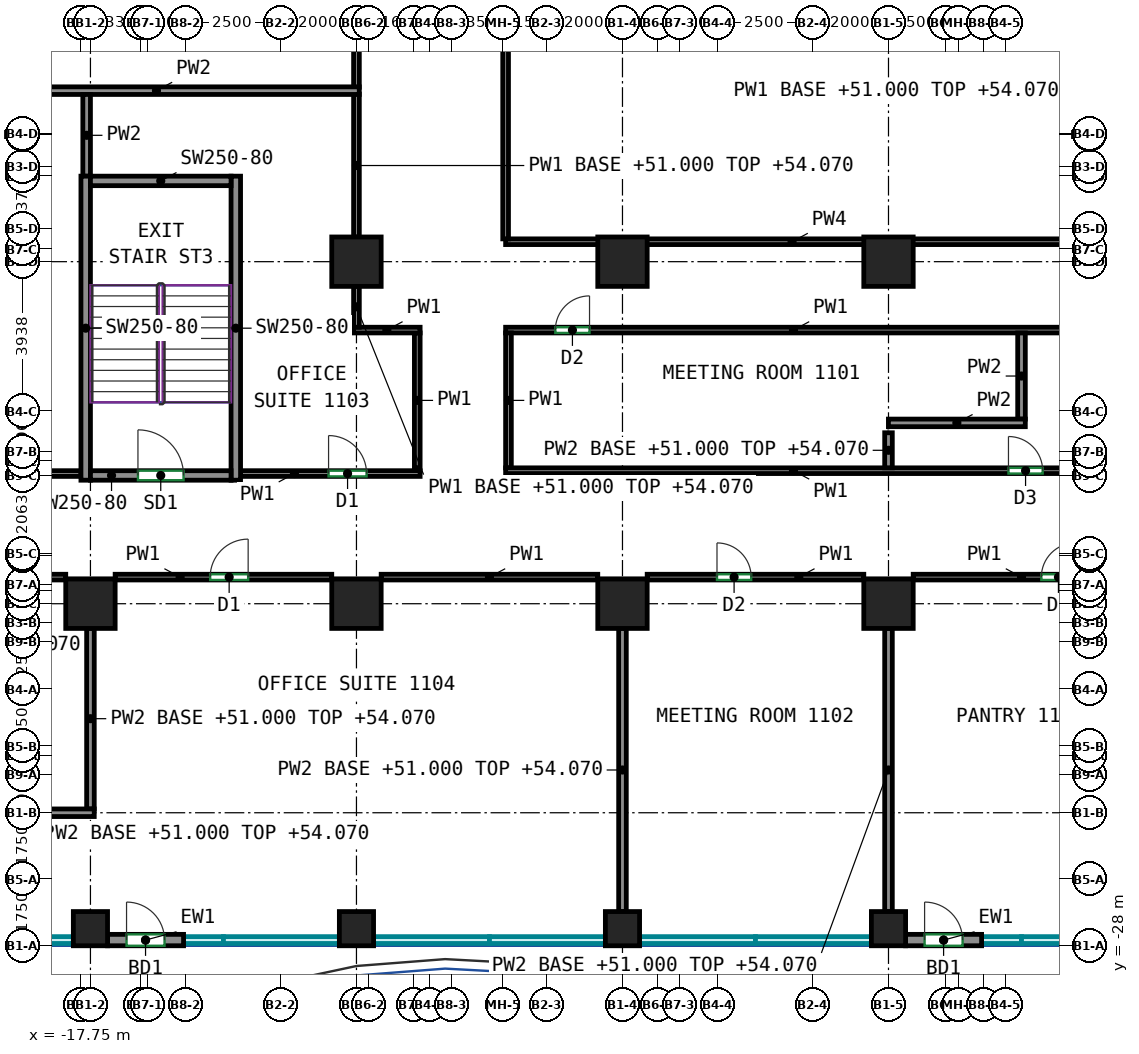
"""IFC4 building model, lengths in metres.
Left out: names, types, materials, properties, quantities, classifications, styles, units other than length and angle.
Written with IfcOpenShell. Run it as: python <this file> out.ifc"""

import sys

from ifc_helpers import new_model, si_unit, direction, frame, frame_2d, origin, origin_2d, place, context, subcontext, project, spatial, rectangle, extrude, source, transform, mapped, element, fill, save


model = new_model("IFC4")
c1 = context("Model", 3, precision=1e-05, world=origin(), true_north=direction((0.0, 1.0)))
c2 = subcontext(c1, "Body", "Model", "MODEL_VIEW")
j1 = project(units=[si_unit("LENGTHUNIT", "METRE"), si_unit("PLANEANGLEUNIT", "RADIAN")], contexts=[c1])
p1 = place(None, origin())
s1 = spatial("IfcSite", under=j1, at=p1, CompositionType="ELEMENT")
p2 = place(p1, origin())
s2 = spatial("IfcBuilding", under=s1, at=p2, CompositionType="ELEMENT")
p3 = place(p2, frame((0.0, 0.0, 51.0)))
s3 = spatial("IfcBuildingStorey", under=s2, at=p3, CompositionType="ELEMENT", Elevation=51.0)
m1 = source(origin(), c2, "Body", "SweptSolid", [
    extrude(rectangle(XDim=0.9, YDim=0.9, at=origin_2d()), origin(), (0.0, 0.0, 1.0), 3.72),
])
p4 = place(p3, frame((-17.5, -27.55, 0.0), z_axis=(0.0, 0.0, 1.0), x_axis=(1.0, 0.0, 0.0)))
e1 = element("IfcColumn", 1, at=p4, inside=s3, PredefinedType="COLUMN", context=c2, shape_type="MappedRepresentation", body=[
    mapped(m1, transform((0.0, 0.0, 0.0))),
])
m2 = source(origin(), c2, "Body", "SweptSolid", [
    extrude(rectangle(XDim=1.3, YDim=1.3, at=origin_2d()), origin(), (0.0, 0.0, 1.0), 3.72),
])
p5 = place(p3, frame((-17.5, -19.0, 0.0), z_axis=(0.0, 0.0, 1.0), x_axis=(1.0, 0.0, 0.0)))
e2 = element("IfcColumn", 2, at=p5, inside=s3, PredefinedType="COLUMN", context=c2, shape_type="MappedRepresentation", body=[
    mapped(m2, transform((0.0, 0.0, 0.0))),
])
p6 = place(p3, frame((-10.5, -27.55, 0.0), z_axis=(0.0, 0.0, 1.0), x_axis=(1.0, 0.0, 0.0)))
e3 = element("IfcColumn", 3, at=p6, inside=s3, PredefinedType="COLUMN", context=c2, shape_type="MappedRepresentation", body=[
    mapped(m1, transform((0.0, 0.0, 0.0))),
])
for number, where, z_axis, x_axis in (
    (4, (-10.5, -19.0, 0.0), (0.0, 0.0, 1.0), (1.0, 0.0, 0.0)),
    (5, (-10.5, -10.0, 0.0), (0.0, 0.0, 1.0), (1.0, 0.0, 0.0)),
):
    element("IfcColumn", number, at=place(p3, frame(where, z_axis=z_axis, x_axis=x_axis)), inside=s3, PredefinedType="COLUMN", context=c2, shape_type="MappedRepresentation", body=[
        mapped(m2, transform((0.0, 0.0, 0.0))),
    ])
p7 = place(p3, frame((-3.5, -27.55, 0.0), z_axis=(0.0, 0.0, 1.0), x_axis=(1.0, 0.0, 0.0)))
e6 = element("IfcColumn", 6, at=p7, inside=s3, PredefinedType="COLUMN", context=c2, shape_type="MappedRepresentation", body=[
    mapped(m1, transform((0.0, 0.0, 0.0))),
])
for number, where, z_axis, x_axis in (
    (7, (-3.5, -19.0, 0.0), (0.0, 0.0, 1.0), (1.0, 0.0, 0.0)),
    (8, (-3.5, -10.0, 0.0), (0.0, 0.0, 1.0), (1.0, 0.0, 0.0)),
):
    element("IfcColumn", number, at=place(p3, frame(where, z_axis=z_axis, x_axis=x_axis)), inside=s3, PredefinedType="COLUMN", context=c2, shape_type="MappedRepresentation", body=[
        mapped(m2, transform((0.0, 0.0, 0.0))),
    ])
p8 = place(p3, frame((3.5, -27.55, 0.0), z_axis=(0.0, 0.0, 1.0), x_axis=(1.0, 0.0, 0.0)))
e9 = element("IfcColumn", 9, at=p8, inside=s3, PredefinedType="COLUMN", context=c2, shape_type="MappedRepresentation", body=[
    mapped(m1, transform((0.0, 0.0, 0.0))),
])
for number, where, z_axis, x_axis in (
    (10, (3.5, -19.0, 0.0), (0.0, 0.0, 1.0), (1.0, 0.0, 0.0)),
    (11, (3.5, -10.0, 0.0), (0.0, 0.0, 1.0), (1.0, 0.0, 0.0)),
):
    element("IfcColumn", number, at=place(p3, frame(where, z_axis=z_axis, x_axis=x_axis)), inside=s3, PredefinedType="COLUMN", context=c2, shape_type="MappedRepresentation", body=[
        mapped(m2, transform((0.0, 0.0, 0.0))),
    ])
m3 = source(origin(), c2, "Body", "SweptSolid", [
    extrude(rectangle(XDim=8.0, YDim=0.25, at=frame_2d((4.0, 0.0))), origin(), (0.0, 0.0, 1.0), 3.72),
])
for number, where, z_axis, x_axis in (
    (12, (-17.625, -15.75, 0.0), (0.0, 0.0, 1.0), (0.0, 1.0, 0.0)),
    (13, (-13.675, -15.75, 0.0), (0.0, 0.0, 1.0), (0.0, 1.0, 0.0)),
):
    element("IfcWall", number, at=place(p3, frame(where, z_axis=z_axis, x_axis=x_axis)), inside=s3, PredefinedType="SHEAR", context=c2, shape_type="MappedRepresentation", body=[
        mapped(m3, transform((0.0, 0.0, 0.0))),
    ])
m4 = source(origin(), c2, "Body", "SweptSolid", [
    extrude(rectangle(XDim=3.7, YDim=0.25, at=frame_2d((1.85, 0.0))), origin(), (0.0, 0.0, 1.0), 3.72),
])
p9 = place(p3, frame((-17.5, -15.625, 0.0), z_axis=(0.0, 0.0, 1.0), x_axis=(1.0, 0.0, 0.0)))
e14 = element("IfcWall", 14, at=p9, inside=s3, PredefinedType="SHEAR", context=c2, shape_type="MappedRepresentation", body=[
    mapped(m4, transform((0.0, 0.0, 0.0))),
])
p10 = place(p9, frame((1.25, 0.0, 0.0)))
e15 = element("IfcOpeningElement", 15, at=p10, cuts=e14, PredefinedType="OPENING", context=c2, shape_type="SweptSolid", body=[
    extrude(rectangle(XDim=1.2, YDim=2.1, at=frame_2d((0.6, 1.05))), frame((0.0, 0.135, 0.0), z_axis=(0.0, -1.0, 0.0), x_axis=(1.0, 0.0, 0.0)), (0.0, 0.0, 1.0), 0.27),
])
p11 = place(p3, frame((-17.5, -7.875, 0.0), z_axis=(0.0, 0.0, 1.0), x_axis=(1.0, 0.0, 0.0)))
e16 = element("IfcWall", 16, at=p11, inside=s3, PredefinedType="SHEAR", context=c2, shape_type="MappedRepresentation", body=[
    mapped(m4, transform((0.0, 0.0, 0.0))),
])
m5 = source(origin(), c2, "Body", "SweptSolid", [
    extrude(rectangle(XDim=2.0, YDim=0.3, at=frame_2d((1.0, 0.0))), origin(), (0.0, 0.0, 1.0), 3.72),
])
p12 = place(p3, frame((-17.05, -27.85, 0.0), z_axis=(0.0, 0.0, 1.0), x_axis=(1.0, 0.0, 0.0)))
e17 = element("IfcWall", 17, at=p12, inside=s3, PredefinedType="SOLIDWALL", context=c2, shape_type="MappedRepresentation", body=[
    mapped(m5, transform((0.0, 0.0, 0.0))),
])
p13 = place(p12, frame((0.5, 0.0, 0.0)))
e18 = element("IfcOpeningElement", 18, at=p13, cuts=e17, PredefinedType="OPENING", context=c2, shape_type="SweptSolid", body=[
    extrude(rectangle(XDim=1.0, YDim=2.1, at=frame_2d((0.5, 1.05))), frame((0.0, 0.16, 0.0), z_axis=(0.0, -1.0, 0.0), x_axis=(1.0, 0.0, 0.0)), (0.0, 0.0, 1.0), 0.32),
])
p14 = place(p3, frame((3.95, -27.85, 0.0), z_axis=(0.0, 0.0, 1.0), x_axis=(1.0, 0.0, 0.0)))
e19 = element("IfcWall", 19, at=p14, inside=s3, PredefinedType="SOLIDWALL", context=c2, shape_type="MappedRepresentation", body=[
    mapped(m5, transform((0.0, 0.0, 0.0))),
])
p15 = place(p14, frame((0.5, 0.0, 0.0)))
e20 = element("IfcOpeningElement", 20, at=p15, cuts=e19, PredefinedType="OPENING", context=c2, shape_type="SweptSolid", body=[
    extrude(rectangle(XDim=1.0, YDim=2.1, at=frame_2d((0.5, 1.05))), frame((0.0, 0.16, 0.0), z_axis=(0.0, -1.0, 0.0), x_axis=(1.0, 0.0, 0.0)), (0.0, 0.0, 1.0), 0.32),
])
p16 = place(p3, frame((-10.5, -5.41, 0.0), z_axis=(0.0, 0.0, 1.0), x_axis=(0.0, 1.0, 0.0)))
e21 = element("IfcWall", 21, at=p16, inside=s3, PredefinedType="PARTITIONING", context=c2, shape_type="SweptSolid", body=[
    extrude(rectangle(XDim=3.76, YDim=0.15, at=frame_2d((1.88, 0.0))), origin(), (0.0, 0.0, 1.0), 3.07),
])
p17 = place(p3, frame((-24.757, -18.3, 0.0), z_axis=(0.0, 0.0, 1.0), x_axis=(1.0, 0.0, 0.0)))
e22 = element("IfcWall", 22, at=p17, inside=s3, PredefinedType="PARTITIONING", context=c2, shape_type="SweptSolid", body=[
    extrude(rectangle(XDim=6.607, YDim=0.15, at=frame_2d((3.304, 0.0))), origin(), (0.0, 0.0, 1.0), 3.72),
])
p18 = place(p3, frame((-24.757, -15.575, 0.0), z_axis=(0.0, 0.0, 1.0), x_axis=(1.0, 0.0, 0.0)))
e23 = element("IfcWall", 23, at=p18, inside=s3, PredefinedType="PARTITIONING", context=c2, shape_type="SweptSolid", body=[
    extrude(rectangle(XDim=7.007, YDim=0.15, at=frame_2d((3.503, 0.0))), origin(), (0.0, 0.0, 1.0), 3.72),
])
p19 = place(p18, frame((4.106, 0.0, 0.0)))
e24 = element("IfcOpeningElement", 24, at=p19, cuts=e23, PredefinedType="OPENING", context=c2, shape_type="SweptSolid", body=[
    extrude(rectangle(XDim=1.8, YDim=2.1, at=frame_2d((0.9, 1.05))), frame((0.0, 0.085, 0.0), z_axis=(0.0, -1.0, 0.0), x_axis=(1.0, 0.0, 0.0)), (0.0, 0.0, 1.0), 0.17),
])
p20 = place(p3, frame((-13.55, -15.575, 0.0), z_axis=(0.0, 0.0, 1.0), x_axis=(1.0, 0.0, 0.0)))
e25 = element("IfcWall", 25, at=p20, inside=s3, PredefinedType="PARTITIONING", context=c2, shape_type="SweptSolid", body=[
    extrude(rectangle(XDim=4.725, YDim=0.15, at=frame_2d((2.363, 0.0))), origin(), (0.0, 0.0, 1.0), 3.72),
])
p21 = place(p20, frame((2.316, 0.0, 0.0)))
e26 = element("IfcOpeningElement", 26, at=p21, cuts=e25, PredefinedType="OPENING", context=c2, shape_type="SweptSolid", body=[
    extrude(rectangle(XDim=1.0, YDim=2.1, at=frame_2d((0.5, 1.05))), frame((0.0, 0.085, 0.0), z_axis=(0.0, -1.0, 0.0), x_axis=(1.0, 0.0, 0.0)), (0.0, 0.0, 1.0), 0.17),
])
p22 = place(p3, frame((-8.9, -11.875, 0.0), z_axis=(0.0, 0.0, 1.0), x_axis=(0.0, -1.0, 0.0)))
e27 = element("IfcWall", 27, at=p22, inside=s3, PredefinedType="PARTITIONING", context=c2, shape_type="SweptSolid", body=[
    extrude(rectangle(XDim=3.55, YDim=0.15, at=frame_2d((1.775, 0.0))), origin(), (0.0, 0.0, 1.0), 3.72),
])
p23 = place(p3, frame((-10.575, -11.8, 0.0), z_axis=(0.0, 0.0, 1.0), x_axis=(1.0, 0.0, 0.0)))
e28 = element("IfcWall", 28, at=p23, inside=s3, PredefinedType="PARTITIONING", context=c2, shape_type="SweptSolid", body=[
    extrude(rectangle(XDim=1.75, YDim=0.15, at=frame_2d((0.875, 0.0))), origin(), (0.0, 0.0, 1.0), 3.72),
])
p24 = place(p3, frame((-10.5, -11.725, 0.0), z_axis=(0.0, 0.0, 1.0), x_axis=(0.0, 1.0, 0.0)))
e29 = element("IfcWall", 29, at=p24, inside=s3, PredefinedType="PARTITIONING", context=c2, shape_type="SweptSolid", body=[
    extrude(rectangle(XDim=1.075, YDim=0.15, at=frame_2d((0.538, 0.0))), origin(), (0.0, 0.0, 1.0), 3.07),
])
p25 = place(p3, frame((-10.5, -9.35, 0.0), z_axis=(0.0, 0.0, 1.0), x_axis=(0.0, 1.0, 0.0)))
e30 = element("IfcWall", 30, at=p25, inside=s3, PredefinedType="PARTITIONING", context=c2, shape_type="SweptSolid", body=[
    extrude(rectangle(XDim=3.76, YDim=0.15, at=frame_2d((1.88, 0.0))), origin(), (0.0, 0.0, 1.0), 3.07),
])
p26 = place(p3, frame((-16.85, -18.3, 0.0), z_axis=(0.0, 0.0, 1.0), x_axis=(1.0, 0.0, 0.0)))
e31 = element("IfcWall", 31, at=p26, inside=s3, PredefinedType="PARTITIONING", context=c2, shape_type="SweptSolid", body=[
    extrude(rectangle(XDim=5.7, YDim=0.15, at=frame_2d((2.85, 0.0))), origin(), (0.0, 0.0, 1.0), 3.72),
])
p27 = place(p26, frame((2.5, 0.0, 0.0)))
e32 = element("IfcOpeningElement", 32, at=p27, cuts=e31, PredefinedType="OPENING", context=c2, shape_type="SweptSolid", body=[
    extrude(rectangle(XDim=1.0, YDim=2.1, at=frame_2d((0.5, 1.05))), frame((0.0, 0.085, 0.0), z_axis=(0.0, -1.0, 0.0), x_axis=(1.0, 0.0, 0.0)), (0.0, 0.0, 1.0), 0.17),
])
p28 = place(p3, frame((-9.85, -18.3, 0.0), z_axis=(0.0, 0.0, 1.0), x_axis=(1.0, 0.0, 0.0)))
e33 = element("IfcWall", 33, at=p28, inside=s3, PredefinedType="PARTITIONING", context=c2, shape_type="SweptSolid", body=[
    extrude(rectangle(XDim=5.7, YDim=0.15, at=frame_2d((2.85, 0.0))), origin(), (0.0, 0.0, 1.0), 3.72),
])
p29 = place(p3, frame((-6.575, -11.8, 0.0), z_axis=(0.0, 0.0, 1.0), x_axis=(1.0, 0.0, 0.0)))
e34 = element("IfcWall", 34, at=p29, inside=s3, PredefinedType="PARTITIONING", context=c2, shape_type="SweptSolid", body=[
    extrude(rectangle(XDim=15.15, YDim=0.15, at=frame_2d((7.575, 0.0))), origin(), (0.0, 0.0, 1.0), 3.72),
])
p30 = place(p29, frame((1.308, 0.0, 0.0)))
e35 = element("IfcOpeningElement", 35, at=p30, cuts=e34, PredefinedType="OPENING", context=c2, shape_type="SweptSolid", body=[
    extrude(rectangle(XDim=0.9, YDim=2.1, at=frame_2d((0.45, 1.05))), frame((0.0, 0.085, 0.0), z_axis=(0.0, -1.0, 0.0), x_axis=(1.0, 0.0, 0.0)), (0.0, 0.0, 1.0), 0.17),
])
p31 = place(p3, frame((-6.5, -15.425, 0.0), z_axis=(0.0, 0.0, 1.0), x_axis=(0.0, 1.0, 0.0)))
e36 = element("IfcWall", 36, at=p31, inside=s3, PredefinedType="PARTITIONING", context=c2, shape_type="SweptSolid", body=[
    extrude(rectangle(XDim=3.55, YDim=0.15, at=frame_2d((1.775, 0.0))), origin(), (0.0, 0.0, 1.0), 3.72),
])
p32 = place(p3, frame((-6.575, -15.5, 0.0), z_axis=(0.0, 0.0, 1.0), x_axis=(1.0, 0.0, 0.0)))
e37 = element("IfcWall", 37, at=p32, inside=s3, PredefinedType="PARTITIONING", context=c2, shape_type="SweptSolid", body=[
    extrude(rectangle(XDim=15.15, YDim=0.15, at=frame_2d((7.575, 0.0))), origin(), (0.0, 0.0, 1.0), 3.72),
])
p33 = place(p32, frame((13.232, 0.0, 0.0)))
e38 = element("IfcOpeningElement", 38, at=p33, cuts=e37, PredefinedType="OPENING", context=c2, shape_type="SweptSolid", body=[
    extrude(rectangle(XDim=0.9, YDim=2.1, at=frame_2d((0.45, 1.05))), frame((0.0, 0.085, 0.0), z_axis=(0.0, -1.0, 0.0), x_axis=(1.0, 0.0, 0.0)), (0.0, 0.0, 1.0), 0.17),
])
p34 = place(p3, frame((-2.85, -18.3, 0.0), z_axis=(0.0, 0.0, 1.0), x_axis=(1.0, 0.0, 0.0)))
e39 = element("IfcWall", 39, at=p34, inside=s3, PredefinedType="PARTITIONING", context=c2, shape_type="SweptSolid", body=[
    extrude(rectangle(XDim=5.7, YDim=0.15, at=frame_2d((2.85, 0.0))), origin(), (0.0, 0.0, 1.0), 3.72),
])
p35 = place(p34, frame((1.837, 0.0, 0.0)))
e40 = element("IfcOpeningElement", 40, at=p35, cuts=e39, PredefinedType="OPENING", context=c2, shape_type="SweptSolid", body=[
    extrude(rectangle(XDim=0.9, YDim=2.1, at=frame_2d((0.45, 1.05))), frame((0.0, 0.085, 0.0), z_axis=(0.0, -1.0, 0.0), x_axis=(1.0, 0.0, 0.0)), (0.0, 0.0, 1.0), 0.17),
])
p36 = place(p3, frame((4.15, -18.3, 0.0), z_axis=(0.0, 0.0, 1.0), x_axis=(1.0, 0.0, 0.0)))
e41 = element("IfcWall", 41, at=p36, inside=s3, PredefinedType="PARTITIONING", context=c2, shape_type="SweptSolid", body=[
    extrude(rectangle(XDim=5.7, YDim=0.15, at=frame_2d((2.85, 0.0))), origin(), (0.0, 0.0, 1.0), 3.72),
])
p37 = place(p36, frame((3.372, 0.0, 0.0)))
e42 = element("IfcOpeningElement", 42, at=p37, cuts=e41, PredefinedType="OPENING", context=c2, shape_type="SweptSolid", body=[
    extrude(rectangle(XDim=0.9, YDim=2.1, at=frame_2d((0.45, 1.05))), frame((0.0, 0.085, 0.0), z_axis=(0.0, -1.0, 0.0), x_axis=(1.0, 0.0, 0.0)), (0.0, 0.0, 1.0), 0.17),
])
p38 = place(p3, frame((-21.1, -5.5, 0.0), z_axis=(0.0, 0.0, 1.0), x_axis=(1.0, 0.0, 0.0)))
e43 = element("IfcWall", 43, at=p38, inside=s3, PredefinedType="PARTITIONING", context=c2, shape_type="SweptSolid", body=[
    extrude(rectangle(XDim=10.674, YDim=0.2, at=frame_2d((5.337, 0.0))), origin(), (0.0, 0.0, 1.0), 3.72),
])
p39 = place(p3, frame((-17.6, -7.75, 0.0), z_axis=(0.0, 0.0, 1.0), x_axis=(0.0, 1.0, 0.0)))
e44 = element("IfcWall", 44, at=p39, inside=s3, PredefinedType="PARTITIONING", context=c2, shape_type="SweptSolid", body=[
    extrude(rectangle(XDim=2.15, YDim=0.2, at=frame_2d((1.075, 0.0))), origin(), (0.0, 0.0, 1.0), 3.72),
])
p40 = place(p3, frame((-17.5, -24.4, 0.0), z_axis=(0.0, 0.0, 1.0), x_axis=(0.0, 1.0, 0.0)))
e45 = element("IfcWall", 45, at=p40, inside=s3, PredefinedType="PARTITIONING", context=c2, shape_type="SweptSolid", body=[
    extrude(rectangle(XDim=4.75, YDim=0.2, at=frame_2d((2.375, 0.0))), origin(), (0.0, 0.0, 1.0), 3.07),
])
p41 = place(p3, frame((-21.1, -24.5, 0.0), z_axis=(0.0, 0.0, 1.0), x_axis=(1.0, 0.0, 0.0)))
e46 = element("IfcWall", 46, at=p41, inside=s3, PredefinedType="PARTITIONING", context=c2, shape_type="SweptSolid", body=[
    extrude(rectangle(XDim=3.7, YDim=0.2, at=frame_2d((1.85, 0.0))), origin(), (0.0, 0.0, 1.0), 3.07),
])
p42 = place(p3, frame((-3.5, -27.1, 0.0), z_axis=(0.0, 0.0, 1.0), x_axis=(0.0, 1.0, 0.0)))
e47 = element("IfcWall", 47, at=p42, inside=s3, PredefinedType="PARTITIONING", context=c2, shape_type="SweptSolid", body=[
    extrude(rectangle(XDim=7.45, YDim=0.2, at=frame_2d((3.725, 0.0))), origin(), (0.0, 0.0, 1.0), 3.07),
])
p43 = place(p3, frame((7.0, -14.142, 0.0), z_axis=(0.0, 0.0, 1.0), x_axis=(0.0, 1.0, 0.0)))
e48 = element("IfcWall", 48, at=p43, inside=s3, PredefinedType="PARTITIONING", context=c2, shape_type="SweptSolid", body=[
    extrude(rectangle(XDim=2.266, YDim=0.2, at=frame_2d((1.133, 0.0))), origin(), (0.0, 0.0, 1.0), 3.72),
])
p44 = place(p3, frame((3.498, -14.242, 0.0), z_axis=(0.0, 0.0, 1.0), x_axis=(1.0, 0.0, 0.0)))
e49 = element("IfcWall", 49, at=p44, inside=s3, PredefinedType="PARTITIONING", context=c2, shape_type="SweptSolid", body=[
    extrude(rectangle(XDim=3.602, YDim=0.2, at=frame_2d((1.801, 0.0))), origin(), (0.0, 0.0, 1.0), 3.72),
])
p45 = place(p3, frame((3.5, -15.424, 0.0), z_axis=(0.0, 0.0, 1.0), x_axis=(0.0, 1.0, 0.0)))
e50 = element("IfcWall", 50, at=p45, inside=s3, PredefinedType="PARTITIONING", context=c2, shape_type="SweptSolid", body=[
    extrude(rectangle(XDim=0.922, YDim=0.2, at=frame_2d((0.461, 0.0))), origin(), (0.0, 0.0, 1.0), 3.07),
])
p46 = place(p3, frame((3.5, -27.1, 0.0), z_axis=(0.0, 0.0, 1.0), x_axis=(0.0, 1.0, 0.0)))
e51 = element("IfcWall", 51, at=p46, inside=s3, PredefinedType="PARTITIONING", context=c2, shape_type="SweptSolid", body=[
    extrude(rectangle(XDim=7.45, YDim=0.2, at=frame_2d((3.725, 0.0))), origin(), (0.0, 0.0, 1.0), 3.07),
])
p47 = place(p3, frame((8.5, -9.475, 0.0), z_axis=(0.0, 0.0, 1.0), x_axis=(-1.0, 0.0, 0.0)))
e52 = element("IfcWall", 52, at=p47, inside=s3, PredefinedType="PARTITIONING", context=c2, shape_type="SweptSolid", body=[
    extrude(rectangle(XDim=15.075, YDim=0.15, at=frame_2d((7.538, 0.0))), origin(), (0.0, 0.0, 1.0), 3.72),
])
p48 = place(p3, frame((-6.575, -9.4, 0.0), z_axis=(0.0, 0.0, 1.0), x_axis=(0.0, 1.0, 0.0)))
e53 = element("IfcWall", 53, at=p48, inside=s3, PredefinedType="PARTITIONING", context=c2, shape_type="SweptSolid", body=[
    extrude(rectangle(XDim=15.0, YDim=0.15, at=frame_2d((7.5, 0.0))), origin(), (0.0, 0.0, 1.0), 3.72),
])
p49 = place(p13, origin())
e54 = element("IfcDoor", 54, at=p49, inside=s3, OperationType="SINGLE_SWING_LEFT", PredefinedType="DOOR", context=c2, shape_type="SweptSolid", body=[
    extrude(rectangle(XDim=1.0, YDim=2.1, at=frame_2d((0.5, 1.05))), frame((0.0, 0.025, 0.0), z_axis=(0.0, -1.0, 0.0), x_axis=(1.0, 0.0, 0.0)), (0.0, 0.0, 1.0), 0.05),
])
fill(e18, e54)
p50 = place(p15, origin())
e55 = element("IfcDoor", 55, at=p50, inside=s3, OperationType="SINGLE_SWING_LEFT", PredefinedType="DOOR", context=c2, shape_type="SweptSolid", body=[
    extrude(rectangle(XDim=1.0, YDim=2.1, at=frame_2d((0.5, 1.05))), frame((0.0, 0.025, 0.0), z_axis=(0.0, -1.0, 0.0), x_axis=(1.0, 0.0, 0.0)), (0.0, 0.0, 1.0), 0.05),
])
fill(e20, e55)
p51 = place(p10, origin())
e56 = element("IfcDoor", 56, at=p51, inside=s3, OperationType="DOUBLE_DOOR_SINGLE_SWING", PredefinedType="DOOR", context=c2, shape_type="SweptSolid", body=[
    extrude(rectangle(XDim=1.2, YDim=2.1, at=frame_2d((0.6, 1.05))), frame((0.0, 0.025, 0.0), z_axis=(0.0, -1.0, 0.0), x_axis=(1.0, 0.0, 0.0)), (0.0, 0.0, 1.0), 0.05),
])
fill(e15, e56)
p52 = place(p27, origin())
e57 = element("IfcDoor", 57, at=p52, inside=s3, OperationType="SINGLE_SWING_RIGHT", PredefinedType="DOOR", context=c2, shape_type="SweptSolid", body=[
    extrude(rectangle(XDim=1.0, YDim=2.1, at=frame_2d((0.5, 1.05))), frame((0.0, 0.025, 0.0), z_axis=(0.0, -1.0, 0.0), x_axis=(1.0, 0.0, 0.0)), (0.0, 0.0, 1.0), 0.05),
])
fill(e32, e57)
p53 = place(p35, origin())
e58 = element("IfcDoor", 58, at=p53, inside=s3, OperationType="SINGLE_SWING_LEFT", PredefinedType="DOOR", context=c2, shape_type="SweptSolid", body=[
    extrude(rectangle(XDim=0.9, YDim=2.1, at=frame_2d((0.45, 1.05))), frame((0.0, 0.025, 0.0), z_axis=(0.0, -1.0, 0.0), x_axis=(1.0, 0.0, 0.0)), (0.0, 0.0, 1.0), 0.05),
])
fill(e40, e58)
p54 = place(p37, origin())
e59 = element("IfcDoor", 59, at=p54, inside=s3, OperationType="SINGLE_SWING_RIGHT", PredefinedType="DOOR", context=c2, shape_type="SweptSolid", body=[
    extrude(rectangle(XDim=0.9, YDim=2.1, at=frame_2d((0.45, 1.05))), frame((0.0, 0.025, 0.0), z_axis=(0.0, -1.0, 0.0), x_axis=(1.0, 0.0, 0.0)), (0.0, 0.0, 1.0), 0.05),
])
fill(e42, e59)
p55 = place(p21, origin())
e60 = element("IfcDoor", 60, at=p55, inside=s3, OperationType="SINGLE_SWING_LEFT", PredefinedType="DOOR", context=c2, shape_type="SweptSolid", body=[
    extrude(rectangle(XDim=1.0, YDim=2.1, at=frame_2d((0.5, 1.05))), frame((0.0, 0.025, 0.0), z_axis=(0.0, -1.0, 0.0), x_axis=(1.0, 0.0, 0.0)), (0.0, 0.0, 1.0), 0.05),
])
fill(e26, e60)
p56 = place(p33, origin())
e61 = element("IfcDoor", 61, at=p56, inside=s3, OperationType="SINGLE_SWING_LEFT", PredefinedType="DOOR", context=c2, shape_type="SweptSolid", body=[
    extrude(rectangle(XDim=0.9, YDim=2.1, at=frame_2d((0.45, 1.05))), frame((0.0, 0.025, 0.0), z_axis=(0.0, -1.0, 0.0), x_axis=(1.0, 0.0, 0.0)), (0.0, 0.0, 1.0), 0.05),
])
fill(e38, e61)
p57 = place(p30, origin())
e62 = element("IfcDoor", 62, at=p57, inside=s3, OperationType="SINGLE_SWING_RIGHT", PredefinedType="DOOR", context=c2, shape_type="SweptSolid", body=[
    extrude(rectangle(XDim=0.9, YDim=2.1, at=frame_2d((0.45, 1.05))), frame((0.0, 0.025, 0.0), z_axis=(0.0, -1.0, 0.0), x_axis=(1.0, 0.0, 0.0)), (0.0, 0.0, 1.0), 0.05),
])
fill(e35, e62)
save(model, sys.argv[1])
